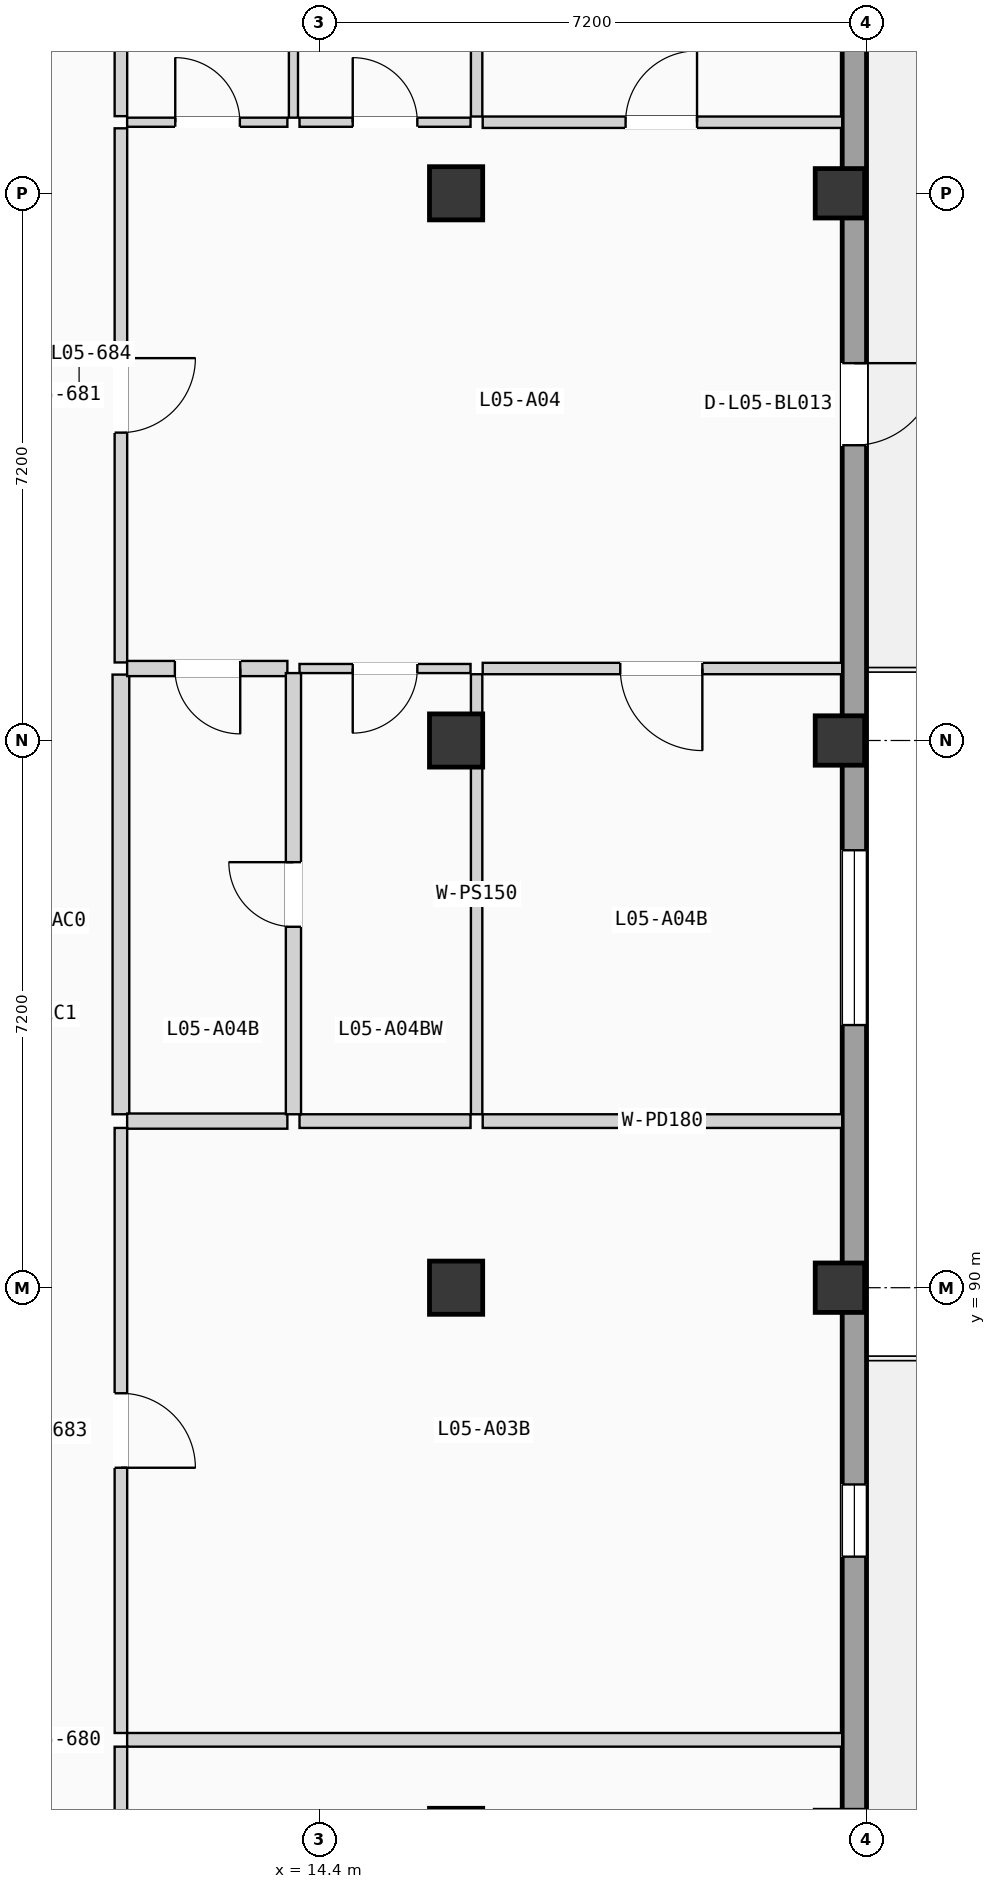
"""IFC4 building model, lengths in metres.
Left out: names, types, materials, properties, quantities, classifications, styles, units other than length and angle.
Written with IfcOpenShell. Run it as: python <this file> out.ifc"""

import sys

from ifc_helpers import new_model, si_unit, direction, frame, frame_2d, origin, origin_2d, place, context, subcontext, project, spatial, rectangle, extrude, element, fill, save


model = new_model("IFC4")
c1 = context("Model", 3, precision=1e-05, world=origin(), true_north=direction((0.0, 1.0)))
c2 = subcontext(c1, "Body", "Model", "MODEL_VIEW")
j1 = project(units=[si_unit("LENGTHUNIT", "METRE"), si_unit("PLANEANGLEUNIT", "RADIAN")], contexts=[c1])
p1 = place(None, origin())
s1 = spatial("IfcSite", under=j1, at=p1, CompositionType="ELEMENT")
p2 = place(p1, origin())
s2 = spatial("IfcBuilding", under=s1, at=p2, CompositionType="ELEMENT")
p3 = place(p2, frame((0.0, 0.0, 18.375)))
s3 = spatial("IfcBuildingStorey", under=s2, at=p3, CompositionType="ELEMENT", Elevation=18.375)
for number, where, z_axis, x_axis in (
    (1, (16.2, 82.8, 0.0), (0.0, 0.0, 1.0), (1.0, 0.0, 0.0)),
    (2, (16.2, 90.0, 0.0), (0.0, 0.0, 1.0), (1.0, 0.0, 0.0)),
    (3, (16.2, 97.2, 0.0), (0.0, 0.0, 1.0), (1.0, 0.0, 0.0)),
    (4, (16.2, 104.4, 0.0), (0.0, 0.0, 1.0), (1.0, 0.0, 0.0)),
):
    element("IfcColumn", number, at=place(p3, frame(where, z_axis=z_axis, x_axis=x_axis)), inside=s3, PredefinedType="COLUMN", context=c2, shape_type="SweptSolid", body=[
        extrude(rectangle(XDim=0.7, YDim=0.7, at=origin_2d()), origin(), (0.0, 0.0, 1.0), 3.15),
    ])
for number, where, z_axis, x_axis in (
    (5, (21.25, 90.0, 0.0), (0.0, 0.0, 1.0), (1.0, 0.0, 0.0)),
    (6, (21.25, 97.2, 0.0), (0.0, 0.0, 1.0), (1.0, 0.0, 0.0)),
    (7, (21.25, 104.4, 0.0), (0.0, 0.0, 1.0), (1.0, 0.0, 0.0)),
):
    element("IfcColumn", number, at=place(p3, frame(where, z_axis=z_axis, x_axis=x_axis)), inside=s3, PredefinedType="COLUMN", context=c2, shape_type="SweptSolid", body=[
        extrude(rectangle(XDim=0.65, YDim=0.65, at=origin_2d()), origin(), (0.0, 0.0, 1.0), 3.15),
    ])
p4 = place(p3, frame((21.44, 68.72, 0.0), z_axis=(0.0, 0.0, 1.0), x_axis=(0.0, 1.0, 0.0)))
e8 = element("IfcWall", 8, at=p4, inside=s3, PredefinedType="SOLIDWALL", context=c2, shape_type="SweptSolid", body=[
    extrude(rectangle(XDim=49.76, YDim=0.32, at=frame_2d((24.88, 0.0))), origin(), (0.0, 0.0, 1.0), 2.89),
])
p5 = place(p4, frame((10.83, 0.0, 0.0)))
e9 = element("IfcOpeningElement", 9, at=p5, cuts=e8, PredefinedType="OPENING", context=c2, shape_type="SweptSolid", body=[
    extrude(rectangle(XDim=0.95, YDim=2.15, at=frame_2d((0.475, 1.075))), frame((0.0, 0.17, 0.0), z_axis=(0.0, -1.0, 0.0), x_axis=(1.0, 0.0, 0.0)), (0.0, 0.0, 1.0), 0.34),
])
p6 = place(p4, frame((17.741, 0.0, 0.85)))
e10 = element("IfcOpeningElement", 10, at=p6, cuts=e8, PredefinedType="OPENING", context=c2, shape_type="SweptSolid", body=[
    extrude(rectangle(XDim=0.95, YDim=1.2, at=frame_2d((0.475, 0.6))), frame((0.0, 0.17, 0.0), z_axis=(0.0, -1.0, 0.0), x_axis=(1.0, 0.0, 0.0)), (0.0, 0.0, 1.0), 0.34),
])
p7 = place(p4, frame((32.365, 0.0, 0.0)))
e11 = element("IfcOpeningElement", 11, at=p7, cuts=e8, PredefinedType="OPENING", context=c2, shape_type="SweptSolid", body=[
    extrude(rectangle(XDim=1.08, YDim=2.18, at=frame_2d((0.54, 1.09))), frame((0.0, 0.17, 0.0), z_axis=(0.0, -1.0, 0.0), x_axis=(1.0, 0.0, 0.0)), (0.0, 0.0, 1.0), 0.34),
])
p8 = place(p4, frame((24.736, 0.0, 0.9)))
e12 = element("IfcOpeningElement", 12, at=p8, cuts=e8, PredefinedType="OPENING", context=c2, shape_type="SweptSolid", body=[
    extrude(rectangle(XDim=2.3, YDim=1.2, at=frame_2d((1.15, 0.6))), frame((0.0, 0.17, 0.0), z_axis=(0.0, -1.0, 0.0), x_axis=(1.0, 0.0, 0.0)), (0.0, 0.0, 1.0), 0.34),
])
p9 = place(p4, frame((38.438, 0.0, 0.855)))
e13 = element("IfcOpeningElement", 13, at=p9, cuts=e8, PredefinedType="OPENING", context=c2, shape_type="SweptSolid", body=[
    extrude(rectangle(XDim=2.3, YDim=1.35, at=frame_2d((1.15, 0.675))), frame((0.0, 0.17, 0.0), z_axis=(0.0, -1.0, 0.0), x_axis=(1.0, 0.0, 0.0)), (0.0, 0.0, 1.0), 0.34),
])
p10 = place(p3, frame((11.79, 75.945, 0.0), z_axis=(0.0, 0.0, 1.0), x_axis=(0.0, 1.0, 0.0)))
e14 = element("IfcWall", 14, at=p10, inside=s3, PredefinedType="PARTITIONING", context=c2, shape_type="SweptSolid", body=[
    extrude(rectangle(XDim=8.016, YDim=0.165, at=frame_2d((4.008, 0.0))), origin(), (0.0, 0.0, 1.0), 2.87),
])
p11 = place(p10, frame((3.546, 0.0, 0.0)))
e15 = element("IfcOpeningElement", 15, at=p11, cuts=e14, PredefinedType="OPENING", context=c2, shape_type="SweptSolid", body=[
    extrude(rectangle(XDim=0.98, YDim=2.08, at=frame_2d((0.49, 1.04))), frame((0.0, 0.093, 0.0), z_axis=(0.0, -1.0, 0.0), x_axis=(1.0, 0.0, 0.0)), (0.0, 0.0, 1.0), 0.185),
])
p12 = place(p3, frame((11.79, 84.141, 0.0), z_axis=(0.0, 0.0, 1.0), x_axis=(0.0, 1.0, 0.0)))
e16 = element("IfcWall", 16, at=p12, inside=s3, PredefinedType="PARTITIONING", context=c2, shape_type="SweptSolid", body=[
    extrude(rectangle(XDim=7.961, YDim=0.165, at=frame_2d((3.98, 0.0))), origin(), (0.0, 0.0, 1.0), 2.87),
])
p13 = place(p12, frame((3.49, 0.0, 0.0)))
e17 = element("IfcOpeningElement", 17, at=p13, cuts=e16, PredefinedType="OPENING", context=c2, shape_type="SweptSolid", body=[
    extrude(rectangle(XDim=0.98, YDim=2.08, at=frame_2d((0.49, 1.04))), frame((0.0, 0.093, 0.0), z_axis=(0.0, -1.0, 0.0), x_axis=(1.0, 0.0, 0.0)), (0.0, 0.0, 1.0), 0.185),
])
p14 = place(p3, frame((11.79, 98.227, 0.0), z_axis=(0.0, 0.0, 1.0), x_axis=(0.0, 1.0, 0.0)))
e18 = element("IfcWall", 18, at=p14, inside=s3, PredefinedType="PARTITIONING", context=c2, shape_type="SweptSolid", body=[
    extrude(rectangle(XDim=7.028, YDim=0.165, at=frame_2d((3.514, 0.0))), origin(), (0.0, 0.0, 1.0), 2.87),
])
p15 = place(p14, frame((3.024, 0.0, 0.0)))
e19 = element("IfcOpeningElement", 19, at=p15, cuts=e18, PredefinedType="OPENING", context=c2, shape_type="SweptSolid", body=[
    extrude(rectangle(XDim=0.98, YDim=2.08, at=frame_2d((0.49, 1.04))), frame((0.0, 0.093, 0.0), z_axis=(0.0, -1.0, 0.0), x_axis=(1.0, 0.0, 0.0)), (0.0, 0.0, 1.0), 0.185),
])
p16 = place(p3, frame((11.79, 92.282, 0.0), z_axis=(0.0, 0.0, 1.0), x_axis=(0.0, 1.0, 0.0)))
e20 = element("IfcWall", 20, at=p16, inside=s3, PredefinedType="PLUMBINGWALL", context=c2, shape_type="SweptSolid", body=[
    extrude(rectangle(XDim=5.785, YDim=0.22, at=frame_2d((2.893, 0.0))), origin(), (0.0, 0.0, 1.0), 2.87),
])
p17 = place(p3, frame((11.79, 105.415, 0.0), z_axis=(0.0, 0.0, 1.0), x_axis=(0.0, 1.0, 0.0)))
e21 = element("IfcWall", 21, at=p17, inside=s3, PredefinedType="PARTITIONING", context=c2, shape_type="SweptSolid", body=[
    extrude(rectangle(XDim=5.785, YDim=0.165, at=frame_2d((2.893, 0.0))), origin(), (0.0, 0.0, 1.0), 2.87),
])
p18 = place(p3, frame((11.872, 84.051, 0.0), z_axis=(0.0, 0.0, 1.0), x_axis=(1.0, 0.0, 0.0)))
e22 = element("IfcWall", 22, at=p18, inside=s3, PredefinedType="PARTITIONING", context=c2, shape_type="SweptSolid", body=[
    extrude(rectangle(XDim=9.408, YDim=0.18, at=frame_2d((4.704, 0.0))), origin(), (0.0, 0.0, 1.0), 2.87),
])
p19 = place(p3, frame((11.872, 92.192, 0.0), z_axis=(0.0, 0.0, 1.0), x_axis=(1.0, 0.0, 0.0)))
e23 = element("IfcWall", 23, at=p19, inside=s3, PredefinedType="PLUMBINGWALL", context=c2, shape_type="SweptSolid", body=[
    extrude(rectangle(XDim=2.108, YDim=0.2, at=frame_2d((1.054, 0.0))), origin(), (0.0, 0.0, 1.0), 2.87),
])
p20 = place(p3, frame((16.55, 92.192, 0.0), z_axis=(0.0, 0.0, 1.0), x_axis=(1.0, 0.0, 0.0)))
e24 = element("IfcWall", 24, at=p20, inside=s3, PredefinedType="PARTITIONING", context=c2, shape_type="SweptSolid", body=[
    extrude(rectangle(XDim=4.73, YDim=0.18, at=frame_2d((2.365, 0.0))), origin(), (0.0, 0.0, 1.0), 2.87),
])
p21 = place(p3, frame((14.14, 92.192, 0.0), z_axis=(0.0, 0.0, 1.0), x_axis=(1.0, 0.0, 0.0)))
e25 = element("IfcWall", 25, at=p21, inside=s3, PredefinedType="PARTITIONING", context=c2, shape_type="SweptSolid", body=[
    extrude(rectangle(XDim=2.25, YDim=0.18, at=frame_2d((1.125, 0.0))), origin(), (0.0, 0.0, 1.0), 2.87),
])
p22 = place(p3, frame((11.872, 98.147, 0.0), z_axis=(0.0, 0.0, 1.0), x_axis=(1.0, 0.0, 0.0)))
e26 = element("IfcWall", 26, at=p22, inside=s3, PredefinedType="PLUMBINGWALL", context=c2, shape_type="SweptSolid", body=[
    extrude(rectangle(XDim=2.108, YDim=0.2, at=frame_2d((1.054, 0.0))), origin(), (0.0, 0.0, 1.0), 2.87),
])
p23 = place(p22, frame((0.628, 0.0, 0.0)))
e27 = element("IfcOpeningElement", 27, at=p23, cuts=e26, PredefinedType="OPENING", context=c2, shape_type="SweptSolid", body=[
    extrude(rectangle(XDim=0.86, YDim=2.0, at=frame_2d((0.43, 1.0))), frame((0.0, 0.11, 0.0), z_axis=(0.0, -1.0, 0.0), x_axis=(1.0, 0.0, 0.0)), (0.0, 0.0, 1.0), 0.22),
])
p24 = place(p3, frame((11.872, 105.335, 0.0), z_axis=(0.0, 0.0, 1.0), x_axis=(1.0, 0.0, 0.0)))
e28 = element("IfcWall", 28, at=p24, inside=s3, PredefinedType="PARTITIONING", context=c2, shape_type="SweptSolid", body=[
    extrude(rectangle(XDim=2.108, YDim=0.12, at=frame_2d((1.054, 0.0))), origin(), (0.0, 0.0, 1.0), 2.87),
])
p25 = place(p24, frame((0.633, 0.0, 0.0)))
e29 = element("IfcOpeningElement", 29, at=p25, cuts=e28, PredefinedType="OPENING", context=c2, shape_type="SweptSolid", body=[
    extrude(rectangle(XDim=0.85, YDim=2.01, at=frame_2d((0.425, 1.005))), frame((0.0, 0.07, 0.0), z_axis=(0.0, -1.0, 0.0), x_axis=(1.0, 0.0, 0.0)), (0.0, 0.0, 1.0), 0.14),
])
p26 = place(p3, frame((16.55, 98.147, 0.0), z_axis=(0.0, 0.0, 1.0), x_axis=(1.0, 0.0, 0.0)))
e30 = element("IfcWall", 30, at=p26, inside=s3, PredefinedType="PARTITIONING", context=c2, shape_type="SweptSolid", body=[
    extrude(rectangle(XDim=4.73, YDim=0.15, at=frame_2d((2.365, 0.0))), origin(), (0.0, 0.0, 1.0), 2.87),
])
p27 = place(p26, frame((1.81, 0.0, 0.0)))
e31 = element("IfcOpeningElement", 31, at=p27, cuts=e30, PredefinedType="OPENING", context=c2, shape_type="SweptSolid", body=[
    extrude(rectangle(XDim=1.08, YDim=2.1, at=frame_2d((0.54, 1.05))), frame((0.0, 0.085, 0.0), z_axis=(0.0, -1.0, 0.0), x_axis=(1.0, 0.0, 0.0)), (0.0, 0.0, 1.0), 0.17),
])
p28 = place(p3, frame((14.14, 98.147, 0.0), z_axis=(0.0, 0.0, 1.0), x_axis=(1.0, 0.0, 0.0)))
e32 = element("IfcWall", 32, at=p28, inside=s3, PredefinedType="PARTITIONING", context=c2, shape_type="SweptSolid", body=[
    extrude(rectangle(XDim=2.25, YDim=0.12, at=frame_2d((1.125, 0.0))), origin(), (0.0, 0.0, 1.0), 2.87),
])
p29 = place(p28, frame((0.7, 0.0, 0.0)))
e33 = element("IfcOpeningElement", 33, at=p29, cuts=e32, PredefinedType="OPENING", context=c2, shape_type="SweptSolid", body=[
    extrude(rectangle(XDim=0.85, YDim=2.01, at=frame_2d((0.425, 1.005))), frame((0.0, 0.07, 0.0), z_axis=(0.0, -1.0, 0.0), x_axis=(1.0, 0.0, 0.0)), (0.0, 0.0, 1.0), 0.14),
])
p30 = place(p3, frame((16.55, 105.335, 0.0), z_axis=(0.0, 0.0, 1.0), x_axis=(1.0, 0.0, 0.0)))
e34 = element("IfcWall", 34, at=p30, inside=s3, PredefinedType="PARTITIONING", context=c2, shape_type="SweptSolid", body=[
    extrude(rectangle(XDim=4.73, YDim=0.15, at=frame_2d((2.365, 0.0))), origin(), (0.0, 0.0, 1.0), 2.87),
])
p31 = place(p30, frame((1.88, 0.0, 0.0)))
e35 = element("IfcOpeningElement", 35, at=p31, cuts=e34, PredefinedType="OPENING", context=c2, shape_type="SweptSolid", body=[
    extrude(rectangle(XDim=0.94, YDim=2.06, at=frame_2d((0.47, 1.03))), frame((0.0, 0.085, 0.0), z_axis=(0.0, -1.0, 0.0), x_axis=(1.0, 0.0, 0.0)), (0.0, 0.0, 1.0), 0.17),
])
p32 = place(p3, frame((14.14, 105.335, 0.0), z_axis=(0.0, 0.0, 1.0), x_axis=(1.0, 0.0, 0.0)))
e36 = element("IfcWall", 36, at=p32, inside=s3, PredefinedType="PARTITIONING", context=c2, shape_type="SweptSolid", body=[
    extrude(rectangle(XDim=2.25, YDim=0.12, at=frame_2d((1.125, 0.0))), origin(), (0.0, 0.0, 1.0), 2.87),
])
p33 = place(p32, frame((0.7, 0.0, 0.0)))
e37 = element("IfcOpeningElement", 37, at=p33, cuts=e36, PredefinedType="OPENING", context=c2, shape_type="SweptSolid", body=[
    extrude(rectangle(XDim=0.85, YDim=2.01, at=frame_2d((0.425, 1.005))), frame((0.0, 0.07, 0.0), z_axis=(0.0, -1.0, 0.0), x_axis=(1.0, 0.0, 0.0)), (0.0, 0.0, 1.0), 0.14),
])
p34 = place(p3, frame((14.06, 92.282, 0.0), z_axis=(0.0, 0.0, 1.0), x_axis=(0.0, 1.0, 0.0)))
e38 = element("IfcWall", 38, at=p34, inside=s3, PredefinedType="PLUMBINGWALL", context=c2, shape_type="SweptSolid", body=[
    extrude(rectangle(XDim=5.805, YDim=0.2, at=frame_2d((2.902, 0.0))), origin(), (0.0, 0.0, 1.0), 2.87),
])
p35 = place(p34, frame((2.467, 0.0, 0.0)))
e39 = element("IfcOpeningElement", 39, at=p35, cuts=e38, PredefinedType="OPENING", context=c2, shape_type="SweptSolid", body=[
    extrude(rectangle(XDim=0.85, YDim=2.01, at=frame_2d((0.425, 1.005))), frame((0.0, 0.11, 0.0), z_axis=(0.0, -1.0, 0.0), x_axis=(1.0, 0.0, 0.0)), (0.0, 0.0, 1.0), 0.22),
])
p36 = place(p3, frame((14.06, 105.395, 0.0), z_axis=(0.0, 0.0, 1.0), x_axis=(0.0, 1.0, 0.0)))
e40 = element("IfcWall", 40, at=p36, inside=s3, PredefinedType="PARTITIONING", context=c2, shape_type="SweptSolid", body=[
    extrude(rectangle(XDim=5.805, YDim=0.12, at=frame_2d((2.902, 0.0))), origin(), (0.0, 0.0, 1.0), 2.87),
])
for number, where, z_axis, x_axis in (
    (41, (16.47, 92.282, 0.0), (0.0, 0.0, 1.0), (0.0, 1.0, 0.0)),
    (42, (16.47, 105.41, 0.0), (0.0, 0.0, 1.0), (0.0, 1.0, 0.0)),
):
    element("IfcWall", number, at=place(p3, frame(where, z_axis=z_axis, x_axis=x_axis)), inside=s3, PredefinedType="PARTITIONING", context=c2, shape_type="SweptSolid", body=[
        extrude(rectangle(XDim=5.79, YDim=0.15, at=frame_2d((2.895, 0.0))), origin(), (0.0, 0.0, 1.0), 2.87),
    ])
p37 = place(p6, origin())
e43 = element("IfcWindow", 43, at=p37, inside=s3, PartitioningType="SINGLE_PANEL", PredefinedType="WINDOW", context=c2, shape_type="SweptSolid", body=[
    extrude(rectangle(XDim=0.95, YDim=1.2, at=frame_2d((0.475, 0.6))), frame((0.0, 0.03, 0.0), z_axis=(0.0, -1.0, 0.0), x_axis=(1.0, 0.0, 0.0)), (0.0, 0.0, 1.0), 0.06),
])
fill(e10, e43)
p38 = place(p7, frame((1.08, 0.0, 0.0), z_axis=(0.0, 0.0, 1.0), x_axis=(-1.0, 0.0, 0.0)))
e44 = element("IfcDoor", 44, at=p38, inside=s3, OperationType="SINGLE_SWING_RIGHT", PredefinedType="DOOR", context=c2, shape_type="SweptSolid", body=[
    extrude(rectangle(XDim=1.08, YDim=2.18, at=frame_2d((0.54, 1.09))), frame((0.0, 0.025, 0.0), z_axis=(0.0, -1.0, 0.0), x_axis=(1.0, 0.0, 0.0)), (0.0, 0.0, 1.0), 0.05),
])
fill(e11, e44)
p39 = place(p8, origin())
e45 = element("IfcWindow", 45, at=p39, inside=s3, PartitioningType="DOUBLE_PANEL_VERTICAL", PredefinedType="WINDOW", context=c2, shape_type="SweptSolid", body=[
    extrude(rectangle(XDim=2.3, YDim=1.2, at=frame_2d((1.15, 0.6))), frame((0.0, 0.03, 0.0), z_axis=(0.0, -1.0, 0.0), x_axis=(1.0, 0.0, 0.0)), (0.0, 0.0, 1.0), 0.06),
])
fill(e12, e45)
p40 = place(p13, frame((0.98, 0.0, 0.0), z_axis=(0.0, 0.0, 1.0), x_axis=(-1.0, 0.0, 0.0)))
e46 = element("IfcDoor", 46, at=p40, inside=s3, OperationType="SINGLE_SWING_LEFT", PredefinedType="DOOR", context=c2, shape_type="SweptSolid", body=[
    extrude(rectangle(XDim=0.98, YDim=2.08, at=frame_2d((0.49, 1.04))), frame((0.0, 0.025, 0.0), z_axis=(0.0, -1.0, 0.0), x_axis=(1.0, 0.0, 0.0)), (0.0, 0.0, 1.0), 0.05),
])
fill(e17, e46)
p41 = place(p15, frame((0.98, 0.0, 0.0), z_axis=(0.0, 0.0, 1.0), x_axis=(-1.0, 0.0, 0.0)))
e47 = element("IfcDoor", 47, at=p41, inside=s3, OperationType="SINGLE_SWING_RIGHT", PredefinedType="DOOR", context=c2, shape_type="SweptSolid", body=[
    extrude(rectangle(XDim=0.98, YDim=2.08, at=frame_2d((0.49, 1.04))), frame((0.0, 0.025, 0.0), z_axis=(0.0, -1.0, 0.0), x_axis=(1.0, 0.0, 0.0)), (0.0, 0.0, 1.0), 0.05),
])
fill(e19, e47)
p42 = place(p23, frame((0.86, 0.0, 0.0), z_axis=(0.0, 0.0, 1.0), x_axis=(-1.0, 0.0, 0.0)))
e48 = element("IfcDoor", 48, at=p42, inside=s3, OperationType="SINGLE_SWING_RIGHT", PredefinedType="DOOR", context=c2, shape_type="SweptSolid", body=[
    extrude(rectangle(XDim=0.86, YDim=2.0, at=frame_2d((0.43, 1.0))), frame((0.0, 0.025, 0.0), z_axis=(0.0, -1.0, 0.0), x_axis=(1.0, 0.0, 0.0)), (0.0, 0.0, 1.0), 0.05),
])
fill(e27, e48)
p43 = place(p25, origin())
e49 = element("IfcDoor", 49, at=p43, inside=s3, OperationType="SINGLE_SWING_LEFT", PredefinedType="DOOR", context=c2, shape_type="SweptSolid", body=[
    extrude(rectangle(XDim=0.85, YDim=2.01, at=frame_2d((0.425, 1.005))), frame((0.0, 0.025, 0.0), z_axis=(0.0, -1.0, 0.0), x_axis=(1.0, 0.0, 0.0)), (0.0, 0.0, 1.0), 0.05),
])
fill(e29, e49)
p44 = place(p27, frame((1.08, 0.0, 0.0), z_axis=(0.0, 0.0, 1.0), x_axis=(-1.0, 0.0, 0.0)))
e50 = element("IfcDoor", 50, at=p44, inside=s3, OperationType="SINGLE_SWING_RIGHT", PredefinedType="DOOR", context=c2, shape_type="SweptSolid", body=[
    extrude(rectangle(XDim=1.08, YDim=2.1, at=frame_2d((0.54, 1.05))), frame((0.0, 0.025, 0.0), z_axis=(0.0, -1.0, 0.0), x_axis=(1.0, 0.0, 0.0)), (0.0, 0.0, 1.0), 0.05),
])
fill(e31, e50)
p45 = place(p29, frame((0.85, 0.0, 0.0), z_axis=(0.0, 0.0, 1.0), x_axis=(-1.0, 0.0, 0.0)))
e51 = element("IfcDoor", 51, at=p45, inside=s3, OperationType="SINGLE_SWING_LEFT", PredefinedType="DOOR", context=c2, shape_type="SweptSolid", body=[
    extrude(rectangle(XDim=0.85, YDim=2.01, at=frame_2d((0.425, 1.005))), frame((0.0, 0.025, 0.0), z_axis=(0.0, -1.0, 0.0), x_axis=(1.0, 0.0, 0.0)), (0.0, 0.0, 1.0), 0.05),
])
fill(e33, e51)
p46 = place(p31, origin())
e52 = element("IfcDoor", 52, at=p46, inside=s3, OperationType="SINGLE_SWING_RIGHT", PredefinedType="DOOR", context=c2, shape_type="SweptSolid", body=[
    extrude(rectangle(XDim=0.94, YDim=2.06, at=frame_2d((0.47, 1.03))), frame((0.0, 0.025, 0.0), z_axis=(0.0, -1.0, 0.0), x_axis=(1.0, 0.0, 0.0)), (0.0, 0.0, 1.0), 0.05),
])
fill(e35, e52)
p47 = place(p33, origin())
e53 = element("IfcDoor", 53, at=p47, inside=s3, OperationType="SINGLE_SWING_LEFT", PredefinedType="DOOR", context=c2, shape_type="SweptSolid", body=[
    extrude(rectangle(XDim=0.85, YDim=2.01, at=frame_2d((0.425, 1.005))), frame((0.0, 0.025, 0.0), z_axis=(0.0, -1.0, 0.0), x_axis=(1.0, 0.0, 0.0)), (0.0, 0.0, 1.0), 0.05),
])
fill(e37, e53)
p48 = place(p35, origin())
e54 = element("IfcDoor", 54, at=p48, inside=s3, OperationType="SINGLE_SWING_RIGHT", PredefinedType="DOOR", context=c2, shape_type="SweptSolid", body=[
    extrude(rectangle(XDim=0.85, YDim=2.01, at=frame_2d((0.425, 1.005))), frame((0.0, 0.025, 0.0), z_axis=(0.0, -1.0, 0.0), x_axis=(1.0, 0.0, 0.0)), (0.0, 0.0, 1.0), 0.05),
])
fill(e39, e54)
save(model, sys.argv[1])
